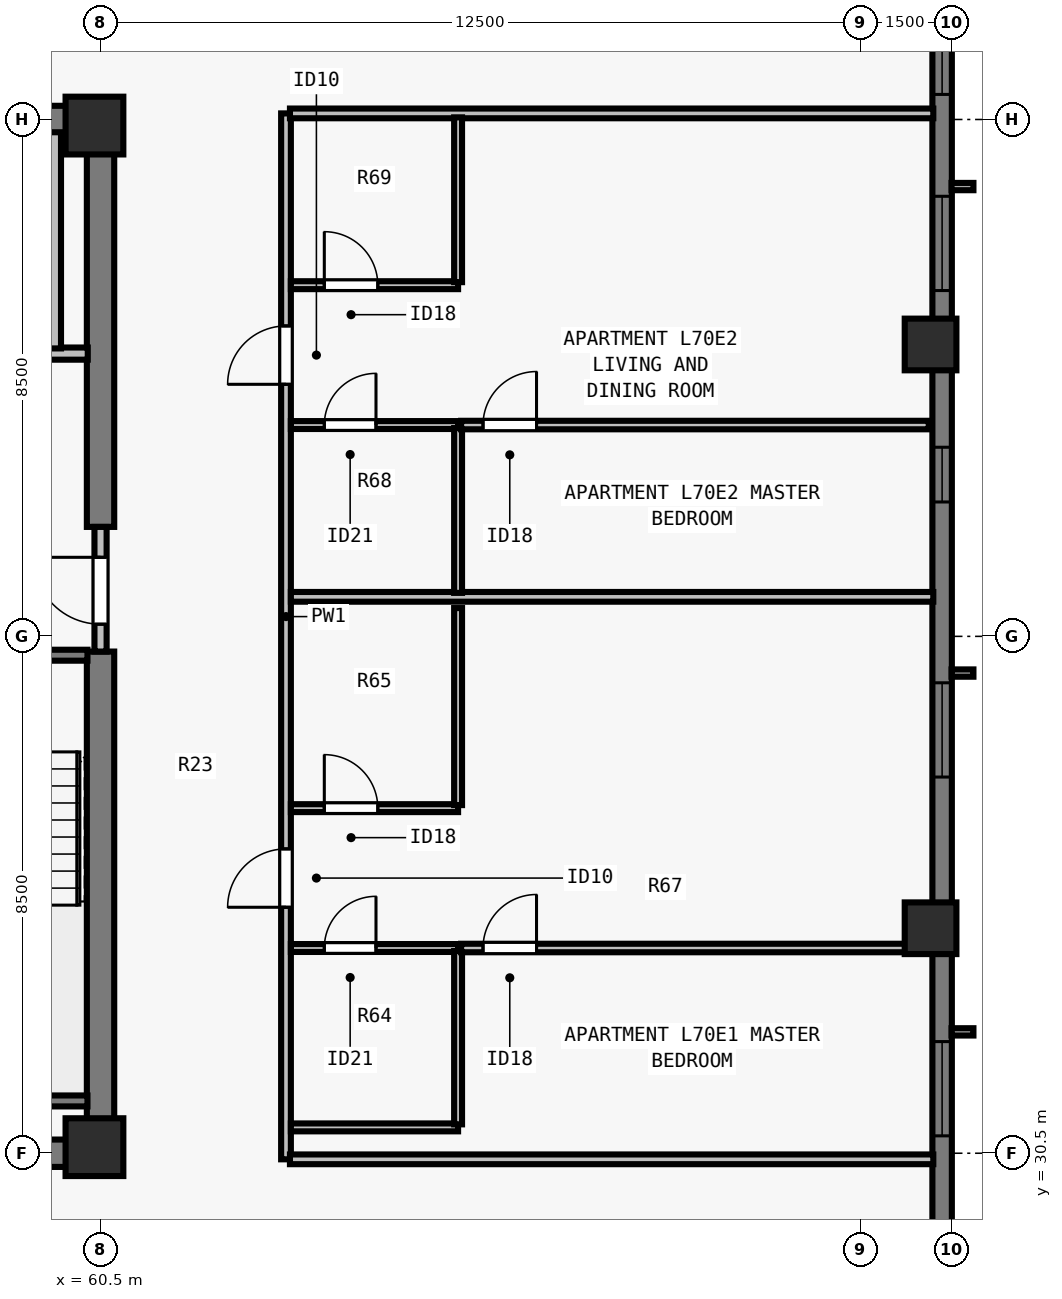
"""IFC4 building model, lengths in metres.
Left out: names, types, materials, properties, quantities, classifications, styles, units other than length and angle.
Written with IfcOpenShell. Run it as: python <this file> out.ifc"""

import sys

from ifc_helpers import new_model, si_unit, direction, frame, frame_2d, origin, origin_2d, place, context, subcontext, project, spatial, rectangle, extrude, element, fill, save


model = new_model("IFC4")
c1 = context("Model", 3, precision=1e-05, world=origin(), true_north=direction((0.0, 1.0)))
c2 = subcontext(c1, "Body", "Model", "MODEL_VIEW")
j1 = project(units=[si_unit("LENGTHUNIT", "METRE"), si_unit("PLANEANGLEUNIT", "RADIAN")], contexts=[c1])
p1 = place(None, origin())
s1 = spatial("IfcSite", under=j1, at=p1, CompositionType="ELEMENT")
p2 = place(p1, origin())
s2 = spatial("IfcBuilding", under=s1, at=p2, CompositionType="ELEMENT")
p3 = place(p2, frame((0.0, 0.0, 255.0)))
s3 = spatial("IfcBuildingStorey", under=s2, at=p3, CompositionType="ELEMENT", Elevation=255.0)
for number, where, z_axis, x_axis in (
    (1, (60.4, 30.6, 0.0), (0.0, 0.0, 1.0), (1.0, 0.0, 0.0)),
    (2, (60.4, 47.4, 0.0), (0.0, 0.0, 1.0), (1.0, 0.0, 0.0)),
):
    element("IfcColumn", number, at=place(p3, frame(where, z_axis=z_axis, x_axis=x_axis)), inside=s3, PredefinedType="COLUMN", context=c2, shape_type="SweptSolid", body=[
        extrude(rectangle(XDim=0.95, YDim=0.95, at=origin_2d()), origin(), (0.0, 0.0, 1.0), 3.5),
    ])
for number, where, z_axis, x_axis in (
    (3, (74.15, 34.2, 0.0), (0.0, 0.0, 1.0), (0.0, 1.0, 0.0)),
    (4, (74.15, 43.8, 0.0), (0.0, 0.0, 1.0), (0.0, 1.0, 0.0)),
):
    element("IfcColumn", number, at=place(p3, frame(where, z_axis=z_axis, x_axis=x_axis)), inside=s3, PredefinedType="COLUMN", context=c2, shape_type="SweptSolid", body=[
        extrude(rectangle(XDim=0.85, YDim=0.85, at=origin_2d()), origin(), (0.0, 0.0, 1.0), 3.5),
    ])
p4 = place(p3, frame((74.34, 56.5, 0.0), z_axis=(0.0, 0.0, 1.0), x_axis=(0.0, -1.0, 0.0)))
e5 = element("IfcWall", 5, at=p4, inside=s3, PredefinedType="SOLIDWALL", context=c2, shape_type="SweptSolid", body=[
    extrude(rectangle(XDim=34.702, YDim=0.32, at=frame_2d((17.351, 0.0))), origin(), (0.0, 0.0, 1.0), 3.29),
])
p5 = place(p4, frame((6.738, 0.0, 0.8)))
e6 = element("IfcOpeningElement", 6, at=p5, cuts=e5, PredefinedType="OPENING", context=c2, shape_type="SweptSolid", body=[
    extrude(rectangle(XDim=1.85, YDim=1.678, at=frame_2d((0.925, 0.839))), frame((0.0, 0.17, 0.0), z_axis=(0.0, -1.0, 0.0), x_axis=(1.0, 0.0, 0.0)), (0.0, 0.0, 1.0), 0.34),
])
p6 = place(p4, frame((10.263, 0.0, 0.8)))
e7 = element("IfcOpeningElement", 7, at=p6, cuts=e5, PredefinedType="OPENING", context=c2, shape_type="SweptSolid", body=[
    extrude(rectangle(XDim=1.55, YDim=1.678, at=frame_2d((0.775, 0.839))), frame((0.0, 0.17, 0.0), z_axis=(0.0, -1.0, 0.0), x_axis=(1.0, 0.0, 0.0)), (0.0, 0.0, 1.0), 0.34),
])
p7 = place(p4, frame((18.264, 0.0, 0.8)))
e8 = element("IfcOpeningElement", 8, at=p7, cuts=e5, PredefinedType="OPENING", context=c2, shape_type="SweptSolid", body=[
    extrude(rectangle(XDim=1.55, YDim=1.678, at=frame_2d((0.775, 0.839))), frame((0.0, 0.17, 0.0), z_axis=(0.0, -1.0, 0.0), x_axis=(1.0, 0.0, 0.0)), (0.0, 0.0, 1.0), 0.34),
])
p8 = place(p4, frame((24.164, 0.0, 0.8)))
e9 = element("IfcOpeningElement", 9, at=p8, cuts=e5, PredefinedType="OPENING", context=c2, shape_type="SweptSolid", body=[
    extrude(rectangle(XDim=1.55, YDim=1.678, at=frame_2d((0.775, 0.839))), frame((0.0, 0.17, 0.0), z_axis=(0.0, -1.0, 0.0), x_axis=(1.0, 0.0, 0.0)), (0.0, 0.0, 1.0), 0.34),
])
p9 = place(p4, frame((14.39, 0.0, 0.8)))
e10 = element("IfcOpeningElement", 10, at=p9, cuts=e5, PredefinedType="OPENING", context=c2, shape_type="SweptSolid", body=[
    extrude(rectangle(XDim=0.9, YDim=1.678, at=frame_2d((0.45, 0.839))), frame((0.0, 0.17, 0.0), z_axis=(0.0, -1.0, 0.0), x_axis=(1.0, 0.0, 0.0)), (0.0, 0.0, 1.0), 0.34),
])
for number, where, z_axis, x_axis in (
    (11, (43.275, 30.5, 0.0), (0.0, 0.0, 1.0), (1.0, 0.0, 0.0)),
    (12, (43.275, 47.5, 0.0), (0.0, 0.0, 1.0), (1.0, 0.0, 0.0)),
):
    element("IfcWall", number, at=place(p3, frame(where, z_axis=z_axis, x_axis=x_axis)), inside=s3, PredefinedType="SHEAR", context=c2, shape_type="SweptSolid", body=[
        extrude(rectangle(XDim=17.45, YDim=0.45, at=frame_2d((8.725, 0.0))), origin(), (0.0, 0.0, 1.0), 3.29),
    ])
p10 = place(p3, frame((60.5, 30.715, 0.0), z_axis=(0.0, 0.0, 1.0), x_axis=(0.0, 1.0, 0.0)))
e13 = element("IfcWall", 13, at=p10, inside=s3, PredefinedType="SHEAR", context=c2, shape_type="SweptSolid", body=[
    extrude(rectangle(XDim=8.035, YDim=0.45, at=frame_2d((4.018, 0.0))), origin(), (0.0, 0.0, 1.0), 3.29),
])
p11 = place(p3, frame((60.5, 40.8, 0.0), z_axis=(0.0, 0.0, 1.0), x_axis=(0.0, 1.0, 0.0)))
e14 = element("IfcWall", 14, at=p11, inside=s3, PredefinedType="SHEAR", context=c2, shape_type="SweptSolid", body=[
    extrude(rectangle(XDim=6.485, YDim=0.45, at=frame_2d((3.242, 0.0))), origin(), (0.0, 0.0, 1.0), 3.29),
])
p12 = place(p3, frame((60.5, 38.75, 0.0), z_axis=(0.0, 0.0, 1.0), x_axis=(0.0, 1.0, 0.0)))
e15 = element("IfcWall", 15, at=p12, inside=s3, PredefinedType="SOLIDWALL", context=c2, shape_type="SweptSolid", body=[
    extrude(rectangle(XDim=2.05, YDim=0.2, at=frame_2d((1.025, 0.0))), origin(), (0.0, 0.0, 1.0), 3.29),
])
p13 = place(p12, frame((0.45, 0.0, 0.0)))
e16 = element("IfcOpeningElement", 16, at=p13, cuts=e15, PredefinedType="OPENING", context=c2, shape_type="SweptSolid", body=[
    extrude(rectangle(XDim=1.1, YDim=2.15, at=frame_2d((0.55, 1.075))), frame((0.0, 0.11, 0.0), z_axis=(0.0, -1.0, 0.0), x_axis=(1.0, 0.0, 0.0)), (0.0, 0.0, 1.0), 0.22),
])
p14 = place(p3, frame((56.735, 43.65, 0.0), z_axis=(0.0, 0.0, 1.0), x_axis=(1.0, 0.0, 0.0)))
e17 = element("IfcWall", 17, at=p14, inside=s3, PredefinedType="SOLIDWALL", context=c2, shape_type="SweptSolid", body=[
    extrude(rectangle(XDim=3.555, YDim=0.2, at=frame_2d((1.777, 0.0))), origin(), (0.0, 0.0, 1.0), 3.29),
])
p15 = place(p14, frame((1.295, 0.0, 0.0)))
e18 = element("IfcOpeningElement", 18, at=p15, cuts=e17, PredefinedType="OPENING", context=c2, shape_type="SweptSolid", body=[
    extrude(rectangle(XDim=1.1, YDim=2.2, at=frame_2d((0.55, 1.1))), frame((0.0, 0.11, 0.0), z_axis=(0.0, -1.0, 0.0), x_axis=(1.0, 0.0, 0.0)), (0.0, 0.0, 1.0), 0.22),
])
p16 = place(p3, frame((59.75, 43.735, 0.0), z_axis=(0.0, 0.0, 1.0), x_axis=(0.0, 1.0, 0.0)))
e19 = element("IfcWall", 19, at=p16, inside=s3, PredefinedType="SOLIDWALL", context=c2, shape_type="SweptSolid", body=[
    extrude(rectangle(XDim=3.555, YDim=0.2, at=frame_2d((1.777, 0.0))), origin(), (0.0, 0.0, 1.0), 3.29),
])
p17 = place(p3, frame((63.55, 30.4, 0.0), z_axis=(0.0, 0.0, 1.0), x_axis=(0.0, 1.0, 0.0)))
e20 = element("IfcWall", 20, at=p17, inside=s3, PredefinedType="PARTITIONING", context=c2, shape_type="SweptSolid", body=[
    extrude(rectangle(XDim=17.2, YDim=0.16, at=frame_2d((8.6, 0.0))), origin(), (0.0, 0.0, 1.0), 3.29),
])
p18 = place(p17, frame((4.145, 0.0, 0.0)))
e21 = element("IfcOpeningElement", 21, at=p18, cuts=e20, PredefinedType="OPENING", context=c2, shape_type="SweptSolid", body=[
    extrude(rectangle(XDim=0.96, YDim=2.18, at=frame_2d((0.48, 1.09))), frame((0.0, 0.09, 0.0), z_axis=(0.0, -1.0, 0.0), x_axis=(1.0, 0.0, 0.0)), (0.0, 0.0, 1.0), 0.18),
])
p19 = place(p17, frame((12.745, 0.0, 0.0)))
e22 = element("IfcOpeningElement", 22, at=p19, cuts=e20, PredefinedType="OPENING", context=c2, shape_type="SweptSolid", body=[
    extrude(rectangle(XDim=0.96, YDim=2.18, at=frame_2d((0.48, 1.09))), frame((0.0, 0.09, 0.0), z_axis=(0.0, -1.0, 0.0), x_axis=(1.0, 0.0, 0.0)), (0.0, 0.0, 1.0), 0.18),
])
for number, where, z_axis, x_axis in (
    (23, (63.615, 30.4, 0.0), (0.0, 0.0, 1.0), (1.0, 0.0, 0.0)),
    (24, (63.615, 47.6, 0.0), (0.0, 0.0, 1.0), (1.0, 0.0, 0.0)),
):
    element("IfcWall", number, at=place(p3, frame(where, z_axis=z_axis, x_axis=x_axis)), inside=s3, PredefinedType="PARTITIONING", context=c2, shape_type="SweptSolid", body=[
        extrude(rectangle(XDim=10.58, YDim=0.16, at=frame_2d((5.29, 0.0))), origin(), (0.0, 0.0, 1.0), 3.29),
    ])
p20 = place(p3, frame((63.63, 39.65, 0.0), z_axis=(0.0, 0.0, 1.0), x_axis=(1.0, 0.0, 0.0)))
e25 = element("IfcWall", 25, at=p20, inside=s3, PredefinedType="PARTITIONING", context=c2, shape_type="SweptSolid", body=[
    extrude(rectangle(XDim=10.565, YDim=0.16, at=frame_2d((5.283, 0.0))), origin(), (0.0, 0.0, 1.0), 3.29),
])
p21 = place(p3, frame((63.63, 30.925, 0.0), z_axis=(0.0, 0.0, 1.0), x_axis=(1.0, 0.0, 0.0)))
e26 = element("IfcWall", 26, at=p21, inside=s3, PredefinedType="PLUMBINGWALL", context=c2, shape_type="SweptSolid", body=[
    extrude(rectangle(XDim=2.75, YDim=0.13, at=frame_2d((1.375, 0.0))), origin(), (0.0, 0.0, 1.0), 3.29),
])
p22 = place(p3, frame((63.63, 33.875, 0.0), z_axis=(0.0, 0.0, 1.0), x_axis=(1.0, 0.0, 0.0)))
e27 = element("IfcWall", 27, at=p22, inside=s3, PredefinedType="PLUMBINGWALL", context=c2, shape_type="SweptSolid", body=[
    extrude(rectangle(XDim=2.75, YDim=0.13, at=frame_2d((1.375, 0.0))), origin(), (0.0, 0.0, 1.0), 3.29),
])
p23 = place(p22, frame((0.55, 0.0, 0.0)))
e28 = element("IfcOpeningElement", 28, at=p23, cuts=e27, PredefinedType="OPENING", context=c2, shape_type="SweptSolid", body=[
    extrude(rectangle(XDim=0.85, YDim=2.08, at=frame_2d((0.425, 1.04))), frame((0.0, 0.075, 0.0), z_axis=(0.0, -1.0, 0.0), x_axis=(1.0, 0.0, 0.0)), (0.0, 0.0, 1.0), 0.15),
])
p24 = place(p3, frame((66.38, 30.975, 0.0), z_axis=(0.0, 0.0, 1.0), x_axis=(0.0, 1.0, 0.0)))
e29 = element("IfcWall", 29, at=p24, inside=s3, PredefinedType="PLUMBINGWALL", context=c2, shape_type="SweptSolid", body=[
    extrude(rectangle(XDim=2.85, YDim=0.13, at=frame_2d((1.425, 0.0))), origin(), (0.0, 0.0, 1.0), 3.29),
])
p25 = place(p3, frame((63.63, 36.175, 0.0), z_axis=(0.0, 0.0, 1.0), x_axis=(1.0, 0.0, 0.0)))
e30 = element("IfcWall", 30, at=p25, inside=s3, PredefinedType="PLUMBINGWALL", context=c2, shape_type="SweptSolid", body=[
    extrude(rectangle(XDim=2.75, YDim=0.13, at=frame_2d((1.375, 0.0))), origin(), (0.0, 0.0, 1.0), 3.29),
])
p26 = place(p25, frame((0.55, 0.0, 0.0)))
e31 = element("IfcOpeningElement", 31, at=p26, cuts=e30, PredefinedType="OPENING", context=c2, shape_type="SweptSolid", body=[
    extrude(rectangle(XDim=0.88, YDim=2.1, at=frame_2d((0.44, 1.05))), frame((0.0, 0.075, 0.0), z_axis=(0.0, -1.0, 0.0), x_axis=(1.0, 0.0, 0.0)), (0.0, 0.0, 1.0), 0.15),
])
p27 = place(p3, frame((66.38, 36.225, 0.0), z_axis=(0.0, 0.0, 1.0), x_axis=(0.0, 1.0, 0.0)))
e32 = element("IfcWall", 32, at=p27, inside=s3, PredefinedType="PLUMBINGWALL", context=c2, shape_type="SweptSolid", body=[
    extrude(rectangle(XDim=3.24, YDim=0.13, at=frame_2d((1.62, 0.0))), origin(), (0.0, 0.0, 1.0), 3.29),
])
p28 = place(p3, frame((66.43, 33.875, 0.0), z_axis=(0.0, 0.0, 1.0), x_axis=(1.0, 0.0, 0.0)))
e33 = element("IfcWall", 33, at=p28, inside=s3, PredefinedType="PARTITIONING", context=c2, shape_type="SweptSolid", body=[
    extrude(rectangle(XDim=7.69, YDim=0.14, at=frame_2d((3.845, 0.0))), origin(), (0.0, 0.0, 1.0), 2.573),
])
p29 = place(p28, frame((0.36, 0.0, 0.0)))
e34 = element("IfcOpeningElement", 34, at=p29, cuts=e33, PredefinedType="OPENING", context=c2, shape_type="SweptSolid", body=[
    extrude(rectangle(XDim=0.88, YDim=2.1, at=frame_2d((0.44, 1.05))), frame((0.0, 0.08, 0.0), z_axis=(0.0, -1.0, 0.0), x_axis=(1.0, 0.0, 0.0)), (0.0, 0.0, 1.0), 0.16),
])
p30 = place(p3, frame((63.63, 42.475, 0.0), z_axis=(0.0, 0.0, 1.0), x_axis=(1.0, 0.0, 0.0)))
e35 = element("IfcWall", 35, at=p30, inside=s3, PredefinedType="PLUMBINGWALL", context=c2, shape_type="SweptSolid", body=[
    extrude(rectangle(XDim=2.75, YDim=0.13, at=frame_2d((1.375, 0.0))), origin(), (0.0, 0.0, 1.0), 3.29),
])
p31 = place(p30, frame((0.55, 0.0, 0.0)))
e36 = element("IfcOpeningElement", 36, at=p31, cuts=e35, PredefinedType="OPENING", context=c2, shape_type="SweptSolid", body=[
    extrude(rectangle(XDim=0.85, YDim=2.08, at=frame_2d((0.425, 1.04))), frame((0.0, 0.075, 0.0), z_axis=(0.0, -1.0, 0.0), x_axis=(1.0, 0.0, 0.0)), (0.0, 0.0, 1.0), 0.15),
])
p32 = place(p3, frame((66.38, 39.715, 0.0), z_axis=(0.0, 0.0, 1.0), x_axis=(0.0, 1.0, 0.0)))
e37 = element("IfcWall", 37, at=p32, inside=s3, PredefinedType="PLUMBINGWALL", context=c2, shape_type="SweptSolid", body=[
    extrude(rectangle(XDim=2.71, YDim=0.13, at=frame_2d((1.355, 0.0))), origin(), (0.0, 0.0, 1.0), 3.29),
])
p33 = place(p3, frame((63.63, 44.775, 0.0), z_axis=(0.0, 0.0, 1.0), x_axis=(1.0, 0.0, 0.0)))
e38 = element("IfcWall", 38, at=p33, inside=s3, PredefinedType="PLUMBINGWALL", context=c2, shape_type="SweptSolid", body=[
    extrude(rectangle(XDim=2.75, YDim=0.13, at=frame_2d((1.375, 0.0))), origin(), (0.0, 0.0, 1.0), 3.29),
])
p34 = place(p33, frame((0.55, 0.0, 0.0)))
e39 = element("IfcOpeningElement", 39, at=p34, cuts=e38, PredefinedType="OPENING", context=c2, shape_type="SweptSolid", body=[
    extrude(rectangle(XDim=0.88, YDim=2.1, at=frame_2d((0.44, 1.05))), frame((0.0, 0.075, 0.0), z_axis=(0.0, -1.0, 0.0), x_axis=(1.0, 0.0, 0.0)), (0.0, 0.0, 1.0), 0.15),
])
p35 = place(p3, frame((66.38, 44.825, 0.0), z_axis=(0.0, 0.0, 1.0), x_axis=(0.0, 1.0, 0.0)))
e40 = element("IfcWall", 40, at=p35, inside=s3, PredefinedType="PLUMBINGWALL", context=c2, shape_type="SweptSolid", body=[
    extrude(rectangle(XDim=2.71, YDim=0.13, at=frame_2d((1.355, 0.0))), origin(), (0.0, 0.0, 1.0), 3.29),
])
p36 = place(p3, frame((66.43, 42.475, 0.0), z_axis=(0.0, 0.0, 1.0), x_axis=(1.0, 0.0, 0.0)))
e41 = element("IfcWall", 41, at=p36, inside=s3, PredefinedType="PARTITIONING", context=c2, shape_type="SweptSolid", body=[
    extrude(rectangle(XDim=7.69, YDim=0.14, at=frame_2d((3.845, 0.0))), origin(), (0.0, 0.0, 1.0), 3.29),
])
p37 = place(p36, frame((0.36, 0.0, 0.0)))
e42 = element("IfcOpeningElement", 42, at=p37, cuts=e41, PredefinedType="OPENING", context=c2, shape_type="SweptSolid", body=[
    extrude(rectangle(XDim=0.88, YDim=2.1, at=frame_2d((0.44, 1.05))), frame((0.0, 0.08, 0.0), z_axis=(0.0, -1.0, 0.0), x_axis=(1.0, 0.0, 0.0)), (0.0, 0.0, 1.0), 0.16),
])
p38 = place(p3, frame((57.005, 38.69, 0.0), z_axis=(0.0, 0.0, 1.0), x_axis=(1.0, 0.0, 0.0)))
e43 = element("IfcWall", 43, at=p38, inside=s3, PredefinedType="SOLIDWALL", context=c2, shape_type="SweptSolid", body=[
    extrude(rectangle(XDim=3.28, YDim=0.18, at=frame_2d((1.64, 0.0))), origin(), (0.0, 0.0, 1.0), 3.29),
])
p39 = place(p38, frame((1.165, 0.0, 0.0)))
e44 = element("IfcOpeningElement", 44, at=p39, cuts=e43, PredefinedType="OPENING", context=c2, shape_type="SweptSolid", body=[
    extrude(rectangle(XDim=0.95, YDim=2.15, at=frame_2d((0.475, 1.075))), frame((0.0, 0.1, 0.0), z_axis=(0.0, -1.0, 0.0), x_axis=(1.0, 0.0, 0.0)), (0.0, 0.0, 1.0), 0.2),
])
p40 = place(p3, frame((57.005, 31.36, 0.0), z_axis=(0.0, 0.0, 1.0), x_axis=(1.0, 0.0, 0.0)))
e45 = element("IfcWall", 45, at=p40, inside=s3, PredefinedType="SOLIDWALL", context=c2, shape_type="SweptSolid", body=[
    extrude(rectangle(XDim=3.28, YDim=0.18, at=frame_2d((1.64, 0.0))), origin(), (0.0, 0.0, 1.0), 3.29),
])
p41 = place(p5, origin())
e46 = element("IfcWindow", 46, at=p41, inside=s3, PartitioningType="SINGLE_PANEL", PredefinedType="WINDOW", context=c2, shape_type="SweptSolid", body=[
    extrude(rectangle(XDim=1.85, YDim=1.678, at=frame_2d((0.925, 0.839))), frame((0.0, -0.05, 0.0), z_axis=(0.0, -1.0, 0.0), x_axis=(1.0, 0.0, 0.0)), (0.0, 0.0, 1.0), 0.06),
])
fill(e6, e46)
p42 = place(p6, origin())
e47 = element("IfcWindow", 47, at=p42, inside=s3, PartitioningType="SINGLE_PANEL", PredefinedType="WINDOW", context=c2, shape_type="SweptSolid", body=[
    extrude(rectangle(XDim=1.55, YDim=1.678, at=frame_2d((0.775, 0.839))), frame((0.0, -0.05, 0.0), z_axis=(0.0, -1.0, 0.0), x_axis=(1.0, 0.0, 0.0)), (0.0, 0.0, 1.0), 0.06),
])
fill(e7, e47)
p43 = place(p7, origin())
e48 = element("IfcWindow", 48, at=p43, inside=s3, PartitioningType="SINGLE_PANEL", PredefinedType="WINDOW", context=c2, shape_type="SweptSolid", body=[
    extrude(rectangle(XDim=1.55, YDim=1.678, at=frame_2d((0.775, 0.839))), frame((0.0, -0.05, 0.0), z_axis=(0.0, -1.0, 0.0), x_axis=(1.0, 0.0, 0.0)), (0.0, 0.0, 1.0), 0.06),
])
fill(e8, e48)
p44 = place(p8, origin())
e49 = element("IfcWindow", 49, at=p44, inside=s3, PartitioningType="SINGLE_PANEL", PredefinedType="WINDOW", context=c2, shape_type="SweptSolid", body=[
    extrude(rectangle(XDim=1.55, YDim=1.678, at=frame_2d((0.775, 0.839))), frame((0.0, -0.05, 0.0), z_axis=(0.0, -1.0, 0.0), x_axis=(1.0, 0.0, 0.0)), (0.0, 0.0, 1.0), 0.06),
])
fill(e9, e49)
p45 = place(p9, origin())
e50 = element("IfcWindow", 50, at=p45, inside=s3, PartitioningType="SINGLE_PANEL", PredefinedType="WINDOW", context=c2, shape_type="SweptSolid", body=[
    extrude(rectangle(XDim=0.9, YDim=1.678, at=frame_2d((0.45, 0.839))), frame((0.0, -0.04, 0.0), z_axis=(0.0, -1.0, 0.0), x_axis=(1.0, 0.0, 0.0)), (0.0, 0.0, 1.0), 0.06),
])
fill(e10, e50)
p46 = place(p13, origin())
e51 = element("IfcDoor", 51, at=p46, inside=s3, OperationType="SINGLE_SWING_RIGHT", PredefinedType="DOOR", context=c2, shape_type="SweptSolid", body=[
    extrude(rectangle(XDim=1.1, YDim=2.15, at=frame_2d((0.55, 1.075))), frame((0.0, 0.025, 0.0), z_axis=(0.0, -1.0, 0.0), x_axis=(1.0, 0.0, 0.0)), (0.0, 0.0, 1.0), 0.05),
])
fill(e16, e51)
p47 = place(p23, origin())
e52 = element("IfcDoor", 52, at=p47, inside=s3, OperationType="SINGLE_SWING_RIGHT", PredefinedType="DOOR", context=c2, shape_type="SweptSolid", body=[
    extrude(rectangle(XDim=0.85, YDim=2.08, at=frame_2d((0.425, 1.04))), frame((0.0, 0.025, 0.0), z_axis=(0.0, -1.0, 0.0), x_axis=(1.0, 0.0, 0.0)), (0.0, 0.0, 1.0), 0.05),
])
fill(e28, e52)
p48 = place(p26, origin())
e53 = element("IfcDoor", 53, at=p48, inside=s3, OperationType="SINGLE_SWING_LEFT", PredefinedType="DOOR", context=c2, shape_type="SweptSolid", body=[
    extrude(rectangle(XDim=0.88, YDim=2.1, at=frame_2d((0.44, 1.05))), frame((0.0, 0.025, 0.0), z_axis=(0.0, -1.0, 0.0), x_axis=(1.0, 0.0, 0.0)), (0.0, 0.0, 1.0), 0.05),
])
fill(e31, e53)
p49 = place(p29, origin())
e54 = element("IfcDoor", 54, at=p49, inside=s3, OperationType="SINGLE_SWING_RIGHT", PredefinedType="DOOR", context=c2, shape_type="SweptSolid", body=[
    extrude(rectangle(XDim=0.88, YDim=2.1, at=frame_2d((0.44, 1.05))), frame((0.0, 0.025, 0.0), z_axis=(0.0, -1.0, 0.0), x_axis=(1.0, 0.0, 0.0)), (0.0, 0.0, 1.0), 0.05),
])
fill(e34, e54)
p50 = place(p18, origin())
e55 = element("IfcDoor", 55, at=p50, inside=s3, OperationType="SINGLE_SWING_LEFT", PredefinedType="DOOR", context=c2, shape_type="SweptSolid", body=[
    extrude(rectangle(XDim=0.96, YDim=2.18, at=frame_2d((0.48, 1.09))), frame((0.0, 0.025, 0.0), z_axis=(0.0, -1.0, 0.0), x_axis=(1.0, 0.0, 0.0)), (0.0, 0.0, 1.0), 0.05),
])
fill(e21, e55)
p51 = place(p31, origin())
e56 = element("IfcDoor", 56, at=p51, inside=s3, OperationType="SINGLE_SWING_RIGHT", PredefinedType="DOOR", context=c2, shape_type="SweptSolid", body=[
    extrude(rectangle(XDim=0.85, YDim=2.08, at=frame_2d((0.425, 1.04))), frame((0.0, 0.025, 0.0), z_axis=(0.0, -1.0, 0.0), x_axis=(1.0, 0.0, 0.0)), (0.0, 0.0, 1.0), 0.05),
])
fill(e36, e56)
p52 = place(p34, origin())
e57 = element("IfcDoor", 57, at=p52, inside=s3, OperationType="SINGLE_SWING_LEFT", PredefinedType="DOOR", context=c2, shape_type="SweptSolid", body=[
    extrude(rectangle(XDim=0.88, YDim=2.1, at=frame_2d((0.44, 1.05))), frame((0.0, 0.025, 0.0), z_axis=(0.0, -1.0, 0.0), x_axis=(1.0, 0.0, 0.0)), (0.0, 0.0, 1.0), 0.05),
])
fill(e39, e57)
p53 = place(p37, origin())
e58 = element("IfcDoor", 58, at=p53, inside=s3, OperationType="SINGLE_SWING_RIGHT", PredefinedType="DOOR", context=c2, shape_type="SweptSolid", body=[
    extrude(rectangle(XDim=0.88, YDim=2.1, at=frame_2d((0.44, 1.05))), frame((0.0, 0.025, 0.0), z_axis=(0.0, -1.0, 0.0), x_axis=(1.0, 0.0, 0.0)), (0.0, 0.0, 1.0), 0.05),
])
fill(e42, e58)
p54 = place(p19, origin())
e59 = element("IfcDoor", 59, at=p54, inside=s3, OperationType="SINGLE_SWING_LEFT", PredefinedType="DOOR", context=c2, shape_type="SweptSolid", body=[
    extrude(rectangle(XDim=0.96, YDim=2.18, at=frame_2d((0.48, 1.09))), frame((0.0, 0.025, 0.0), z_axis=(0.0, -1.0, 0.0), x_axis=(1.0, 0.0, 0.0)), (0.0, 0.0, 1.0), 0.05),
])
fill(e22, e59)
save(model, sys.argv[1])
